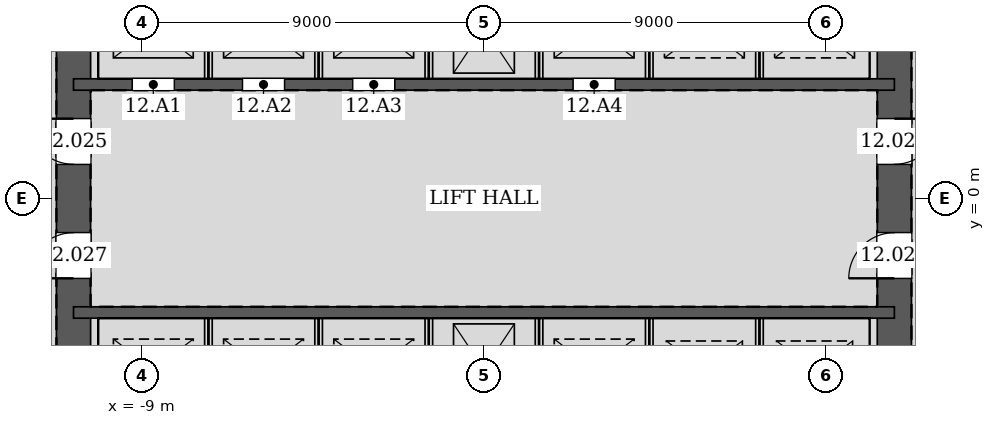
"""IFC4 building model, lengths in metres.
Left out: names, types, materials, properties, quantities, classifications, styles, units other than length and angle.
Written with IfcOpenShell. Run it as: python <this file> out.ifc"""

import sys

from ifc_helpers import new_model, si_unit, direction, frame, frame_2d, origin, place, context, subcontext, project, spatial, rectangle, extrude, element, fill, save


model = new_model("IFC4")
c1 = context("Model", 3, precision=1e-05, world=origin(), true_north=direction((0.0, 1.0)))
c2 = subcontext(c1, "Body", "Model", "MODEL_VIEW")
j1 = project(units=[si_unit("LENGTHUNIT", "METRE"), si_unit("PLANEANGLEUNIT", "RADIAN")], contexts=[c1])
p1 = place(None, origin())
s1 = spatial("IfcSite", under=j1, at=p1, CompositionType="ELEMENT")
p2 = place(p1, origin())
s2 = spatial("IfcBuilding", under=s1, at=p2, CompositionType="ELEMENT")
p3 = place(p2, frame((0.0, 0.0, 58.2)))
s3 = spatial("IfcBuildingStorey", under=s2, at=p3, CompositionType="ELEMENT", Elevation=58.2)
p4 = place(p3, frame((10.8, -10.8, 0.0), z_axis=(0.0, 0.0, 1.0), x_axis=(0.0, 1.0, 0.0)))
e1 = element("IfcWall", 1, at=p4, inside=s3, PredefinedType="SOLIDWALL", context=c2, shape_type="SweptSolid", body=[
    extrude(rectangle(XDim=21.6, YDim=0.9, at=frame_2d((10.8, 0.0))), origin(), (0.0, 0.0, 1.0), 4.2),
])
p5 = place(p4, frame((11.7, 0.0, 0.0)))
e2 = element("IfcOpeningElement", 2, at=p5, cuts=e1, PredefinedType="OPENING", context=c2, shape_type="SweptSolid", body=[
    extrude(rectangle(XDim=1.2, YDim=2.1, at=frame_2d((0.6, 1.05))), frame((0.0, 0.46, 0.0), z_axis=(0.0, -1.0, 0.0), x_axis=(1.0, 0.0, 0.0)), (0.0, 0.0, 1.0), 0.92),
])
p6 = place(p4, frame((8.7, 0.0, 0.0)))
e3 = element("IfcOpeningElement", 3, at=p6, cuts=e1, PredefinedType="OPENING", context=c2, shape_type="SweptSolid", body=[
    extrude(rectangle(XDim=1.2, YDim=2.1, at=frame_2d((0.6, 1.05))), frame((0.0, 0.46, 0.0), z_axis=(0.0, -1.0, 0.0), x_axis=(1.0, 0.0, 0.0)), (0.0, 0.0, 1.0), 0.92),
])
p7 = place(p3, frame((-10.8, 10.8, 0.0), z_axis=(0.0, 0.0, 1.0), x_axis=(0.0, -1.0, 0.0)))
e4 = element("IfcWall", 4, at=p7, inside=s3, PredefinedType="SOLIDWALL", context=c2, shape_type="SweptSolid", body=[
    extrude(rectangle(XDim=21.6, YDim=0.9, at=frame_2d((10.8, 0.0))), origin(), (0.0, 0.0, 1.0), 4.2),
])
p8 = place(p7, frame((8.7, 0.0, 0.0)))
e5 = element("IfcOpeningElement", 5, at=p8, cuts=e4, PredefinedType="OPENING", context=c2, shape_type="SweptSolid", body=[
    extrude(rectangle(XDim=1.2, YDim=2.1, at=frame_2d((0.6, 1.05))), frame((0.0, 0.46, 0.0), z_axis=(0.0, -1.0, 0.0), x_axis=(1.0, 0.0, 0.0)), (0.0, 0.0, 1.0), 0.92),
])
p9 = place(p7, frame((11.7, 0.0, 0.0)))
e6 = element("IfcOpeningElement", 6, at=p9, cuts=e4, PredefinedType="OPENING", context=c2, shape_type="SweptSolid", body=[
    extrude(rectangle(XDim=1.2, YDim=2.1, at=frame_2d((0.6, 1.05))), frame((0.0, 0.46, 0.0), z_axis=(0.0, -1.0, 0.0), x_axis=(1.0, 0.0, 0.0)), (0.0, 0.0, 1.0), 0.92),
])
p10 = place(p3, frame((-10.8, 3.0, 0.0), z_axis=(0.0, 0.0, 1.0), x_axis=(1.0, 0.0, 0.0)))
e7 = element("IfcWall", 7, at=p10, inside=s3, PredefinedType="SOLIDWALL", context=c2, shape_type="SweptSolid", body=[
    extrude(rectangle(XDim=21.6, YDim=0.3, at=frame_2d((10.8, 0.0))), origin(), (0.0, 0.0, 1.0), 4.2),
])
p11 = place(p10, frame((1.55, 0.0, 0.0)))
e8 = element("IfcOpeningElement", 8, at=p11, cuts=e7, PredefinedType="OPENING", context=c2, shape_type="SweptSolid", body=[
    extrude(rectangle(XDim=1.1, YDim=2.1, at=frame_2d((0.55, 1.05))), frame((0.0, 0.16, 0.0), z_axis=(0.0, -1.0, 0.0), x_axis=(1.0, 0.0, 0.0)), (0.0, 0.0, 1.0), 0.32),
])
p12 = place(p10, frame((4.45, 0.0, 0.0)))
e9 = element("IfcOpeningElement", 9, at=p12, cuts=e7, PredefinedType="OPENING", context=c2, shape_type="SweptSolid", body=[
    extrude(rectangle(XDim=1.1, YDim=2.1, at=frame_2d((0.55, 1.05))), frame((0.0, 0.16, 0.0), z_axis=(0.0, -1.0, 0.0), x_axis=(1.0, 0.0, 0.0)), (0.0, 0.0, 1.0), 0.32),
])
p13 = place(p10, frame((7.35, 0.0, 0.0)))
e10 = element("IfcOpeningElement", 10, at=p13, cuts=e7, PredefinedType="OPENING", context=c2, shape_type="SweptSolid", body=[
    extrude(rectangle(XDim=1.1, YDim=2.1, at=frame_2d((0.55, 1.05))), frame((0.0, 0.16, 0.0), z_axis=(0.0, -1.0, 0.0), x_axis=(1.0, 0.0, 0.0)), (0.0, 0.0, 1.0), 0.32),
])
p14 = place(p10, frame((13.15, 0.0, 0.0)))
e11 = element("IfcOpeningElement", 11, at=p14, cuts=e7, PredefinedType="OPENING", context=c2, shape_type="SweptSolid", body=[
    extrude(rectangle(XDim=1.1, YDim=2.1, at=frame_2d((0.55, 1.05))), frame((0.0, 0.16, 0.0), z_axis=(0.0, -1.0, 0.0), x_axis=(1.0, 0.0, 0.0)), (0.0, 0.0, 1.0), 0.32),
])
p15 = place(p3, frame((-10.8, -3.0, 0.0), z_axis=(0.0, 0.0, 1.0), x_axis=(1.0, 0.0, 0.0)))
e12 = element("IfcWall", 12, at=p15, inside=s3, PredefinedType="SOLIDWALL", context=c2, shape_type="SweptSolid", body=[
    extrude(rectangle(XDim=21.6, YDim=0.3, at=frame_2d((10.8, 0.0))), origin(), (0.0, 0.0, 1.0), 4.2),
])
for number, where, z_axis, x_axis in (
    (13, (-7.25, 3.15, 0.0), (0.0, 0.0, 1.0), (0.0, 1.0, 0.0)),
    (14, (-4.35, 3.15, 0.0), (0.0, 0.0, 1.0), (0.0, 1.0, 0.0)),
    (15, (-1.45, 3.15, 0.0), (0.0, 0.0, 1.0), (0.0, 1.0, 0.0)),
    (16, (1.45, 3.15, 0.0), (0.0, 0.0, 1.0), (0.0, 1.0, 0.0)),
    (17, (4.35, 3.15, 0.0), (0.0, 0.0, 1.0), (0.0, 1.0, 0.0)),
    (18, (7.25, 3.15, 0.0), (0.0, 0.0, 1.0), (0.0, 1.0, 0.0)),
    (19, (-7.25, -5.85, 0.0), (0.0, 0.0, 1.0), (0.0, 1.0, 0.0)),
    (20, (-4.35, -5.85, 0.0), (0.0, 0.0, 1.0), (0.0, 1.0, 0.0)),
    (21, (-1.45, -5.85, 0.0), (0.0, 0.0, 1.0), (0.0, 1.0, 0.0)),
    (22, (1.45, -5.85, 0.0), (0.0, 0.0, 1.0), (0.0, 1.0, 0.0)),
    (23, (4.35, -5.85, 0.0), (0.0, 0.0, 1.0), (0.0, 1.0, 0.0)),
    (24, (7.25, -5.85, 0.0), (0.0, 0.0, 1.0), (0.0, 1.0, 0.0)),
):
    element("IfcWall", number, at=place(p3, frame(where, z_axis=z_axis, x_axis=x_axis)), inside=s3, PredefinedType="PARTITIONING", context=c2, shape_type="SweptSolid", body=[
        extrude(rectangle(XDim=2.7, YDim=0.2, at=frame_2d((1.35, 0.0))), origin(), (0.0, 0.0, 1.0), 4.2),
    ])
p16 = place(p5, frame((1.2, 0.0, 0.0), z_axis=(0.0, 0.0, 1.0), x_axis=(-1.0, 0.0, 0.0)))
e25 = element("IfcDoor", 25, at=p16, inside=s3, OperationType="SINGLE_SWING_LEFT", PredefinedType="DOOR", context=c2, shape_type="SweptSolid", body=[
    extrude(rectangle(XDim=1.2, YDim=2.1, at=frame_2d((0.6, 1.05))), frame((0.0, 0.025, 0.0), z_axis=(0.0, -1.0, 0.0), x_axis=(1.0, 0.0, 0.0)), (0.0, 0.0, 1.0), 0.05),
])
fill(e2, e25)
p17 = place(p8, frame((1.2, 0.0, 0.0), z_axis=(0.0, 0.0, 1.0), x_axis=(-1.0, 0.0, 0.0)))
e26 = element("IfcDoor", 26, at=p17, inside=s3, OperationType="SINGLE_SWING_RIGHT", PredefinedType="DOOR", context=c2, shape_type="SweptSolid", body=[
    extrude(rectangle(XDim=1.2, YDim=2.1, at=frame_2d((0.6, 1.05))), frame((0.0, 0.025, 0.0), z_axis=(0.0, -1.0, 0.0), x_axis=(1.0, 0.0, 0.0)), (0.0, 0.0, 1.0), 0.05),
])
fill(e5, e26)
p18 = place(p6, origin())
e27 = element("IfcDoor", 27, at=p18, inside=s3, OperationType="SINGLE_SWING_LEFT", PredefinedType="DOOR", context=c2, shape_type="SweptSolid", body=[
    extrude(rectangle(XDim=1.2, YDim=2.1, at=frame_2d((0.6, 1.05))), frame((0.0, 0.025, 0.0), z_axis=(0.0, -1.0, 0.0), x_axis=(1.0, 0.0, 0.0)), (0.0, 0.0, 1.0), 0.05),
])
fill(e3, e27)
p19 = place(p9, frame((1.2, 0.0, 0.0), z_axis=(0.0, 0.0, 1.0), x_axis=(-1.0, 0.0, 0.0)))
e28 = element("IfcDoor", 28, at=p19, inside=s3, OperationType="SINGLE_SWING_LEFT", PredefinedType="DOOR", context=c2, shape_type="SweptSolid", body=[
    extrude(rectangle(XDim=1.2, YDim=2.1, at=frame_2d((0.6, 1.05))), frame((0.0, 0.025, 0.0), z_axis=(0.0, -1.0, 0.0), x_axis=(1.0, 0.0, 0.0)), (0.0, 0.0, 1.0), 0.05),
])
fill(e6, e28)
p20 = place(p11, origin())
e29 = element("IfcDoor", 29, at=p20, inside=s3, OperationType="DOUBLE_DOOR_SLIDING", PredefinedType="DOOR", context=c2, shape_type="SweptSolid", body=[
    extrude(rectangle(XDim=1.1, YDim=2.1, at=frame_2d((0.55, 1.05))), frame((0.0, 0.025, 0.0), z_axis=(0.0, -1.0, 0.0), x_axis=(1.0, 0.0, 0.0)), (0.0, 0.0, 1.0), 0.05),
])
fill(e8, e29)
p21 = place(p12, origin())
e30 = element("IfcDoor", 30, at=p21, inside=s3, OperationType="DOUBLE_DOOR_SLIDING", PredefinedType="DOOR", context=c2, shape_type="SweptSolid", body=[
    extrude(rectangle(XDim=1.1, YDim=2.1, at=frame_2d((0.55, 1.05))), frame((0.0, 0.025, 0.0), z_axis=(0.0, -1.0, 0.0), x_axis=(1.0, 0.0, 0.0)), (0.0, 0.0, 1.0), 0.05),
])
fill(e9, e30)
p22 = place(p13, origin())
e31 = element("IfcDoor", 31, at=p22, inside=s3, OperationType="DOUBLE_DOOR_SLIDING", PredefinedType="DOOR", context=c2, shape_type="SweptSolid", body=[
    extrude(rectangle(XDim=1.1, YDim=2.1, at=frame_2d((0.55, 1.05))), frame((0.0, 0.025, 0.0), z_axis=(0.0, -1.0, 0.0), x_axis=(1.0, 0.0, 0.0)), (0.0, 0.0, 1.0), 0.05),
])
fill(e10, e31)
p23 = place(p14, origin())
e32 = element("IfcDoor", 32, at=p23, inside=s3, OperationType="DOUBLE_DOOR_SLIDING", PredefinedType="DOOR", context=c2, shape_type="SweptSolid", body=[
    extrude(rectangle(XDim=1.1, YDim=2.1, at=frame_2d((0.55, 1.05))), frame((0.0, 0.025, 0.0), z_axis=(0.0, -1.0, 0.0), x_axis=(1.0, 0.0, 0.0)), (0.0, 0.0, 1.0), 0.05),
])
fill(e11, e32)
save(model, sys.argv[1])
